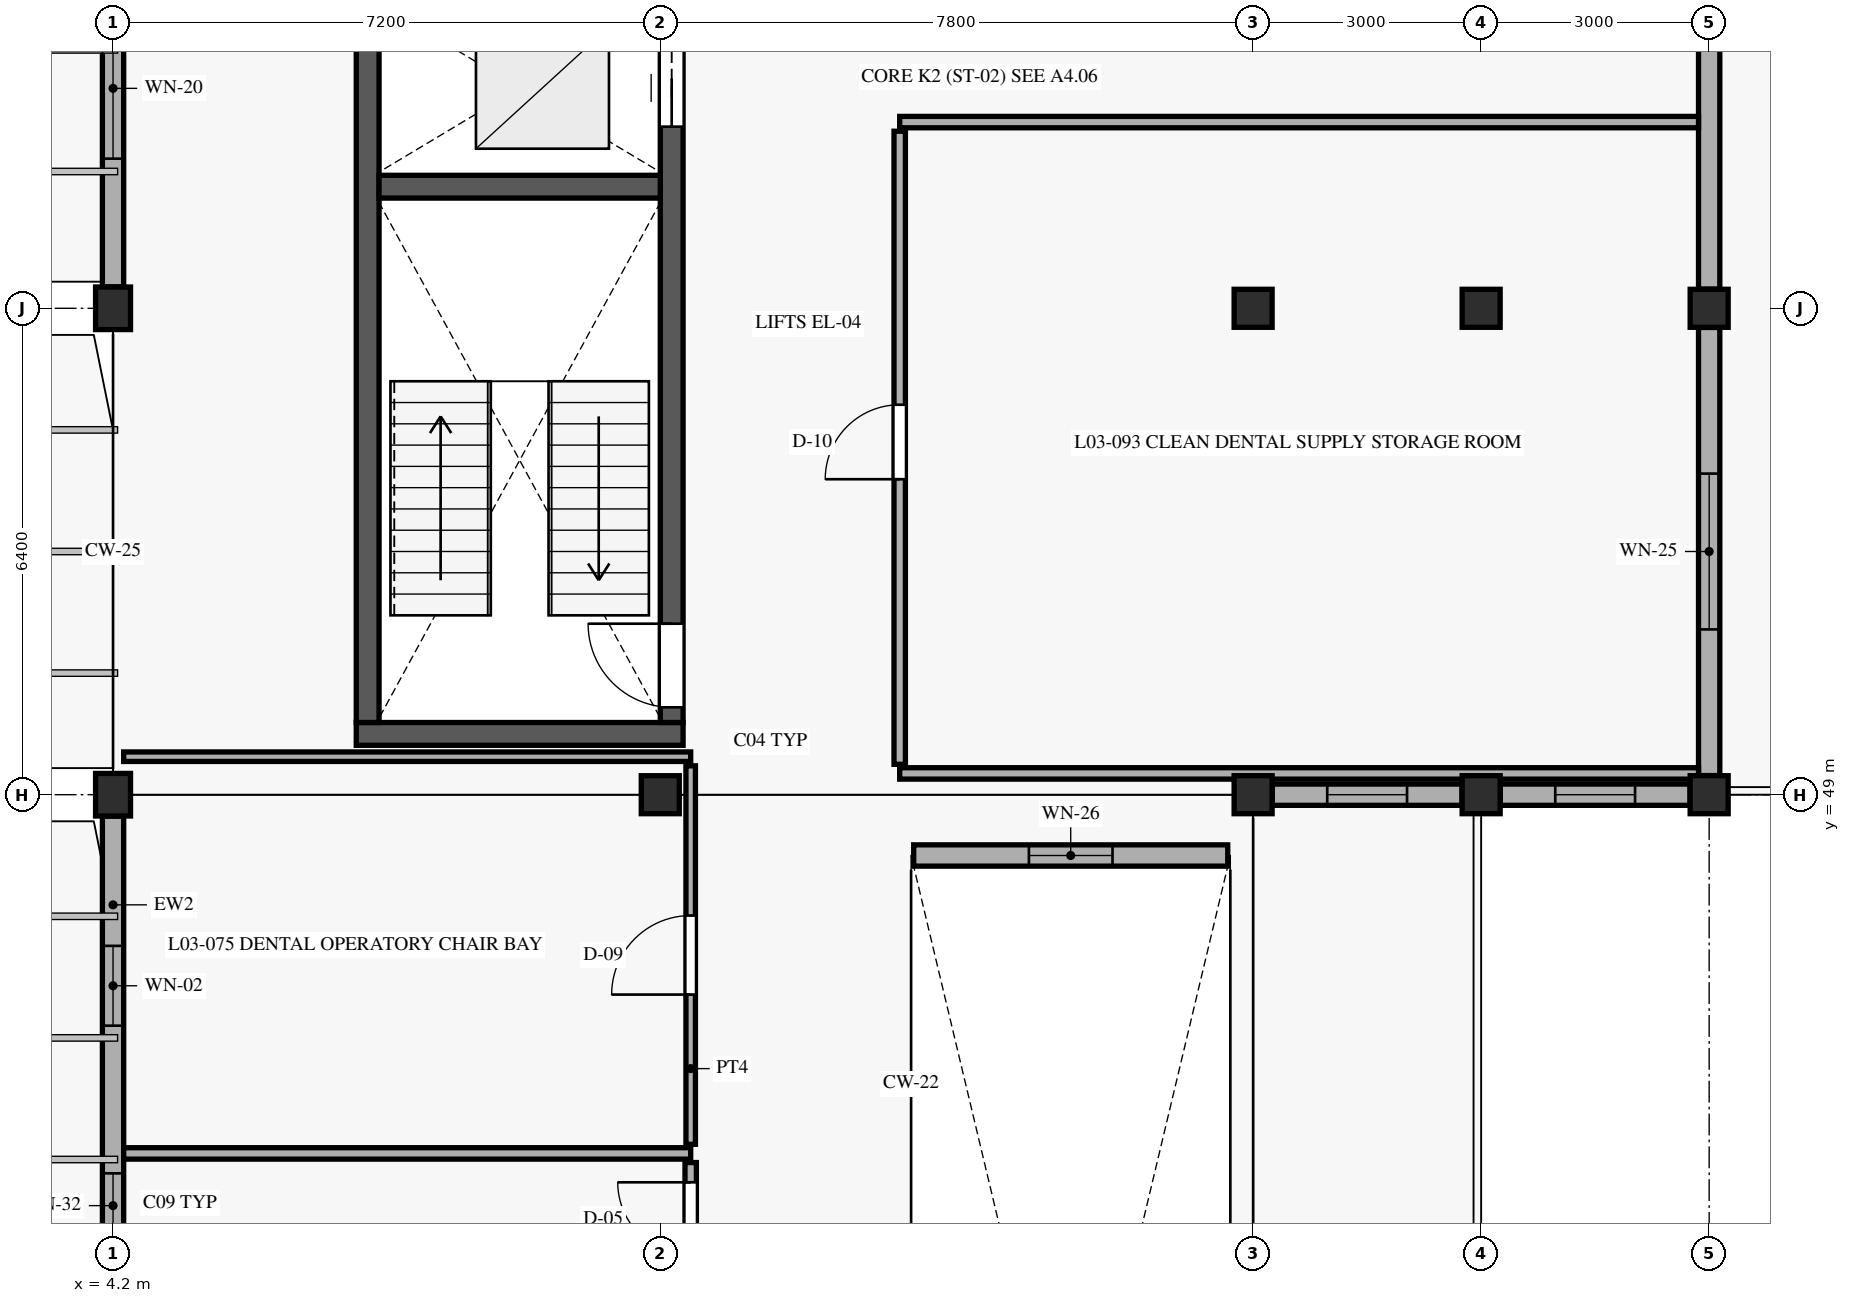
"""IFC4 building model, lengths in metres.
Left out: names, types, materials, properties, quantities, classifications, styles, units other than length and angle.
Written with IfcOpenShell. Run it as: python <this file> out.ifc"""

import sys

from ifc_helpers import new_model, si_unit, direction, frame, frame_2d, origin, origin_with_axes, origin_2d, place, context, subcontext, project, spatial, rectangle, extrude, element, fill, save


model = new_model("IFC4")
c1 = context("Model", 3, precision=1e-05, world=origin(), true_north=direction((0.0, 1.0)))
c2 = subcontext(c1, "Body", "Model", "MODEL_VIEW")
j1 = project(units=[si_unit("LENGTHUNIT", "METRE"), si_unit("PLANEANGLEUNIT", "RADIAN")], contexts=[c1])
p1 = place(None, origin())
s1 = spatial("IfcSite", under=j1, at=p1, CompositionType="ELEMENT")
p2 = place(p1, origin())
s2 = spatial("IfcBuilding", under=s1, at=p2, CompositionType="ELEMENT")
p3 = place(p2, frame((0.0, 0.0, 9.3)))
s3 = spatial("IfcBuildingStorey", under=s2, at=p3, CompositionType="ELEMENT", Elevation=9.3)
for number, where, z_axis, x_axis in (
    (1, (4.2, 49.0, 0.0), (0.0, 0.0, 1.0), (1.0, 0.0, 0.0)),
    (2, (4.2, 55.4, 0.0), (0.0, 0.0, 1.0), (1.0, 0.0, 0.0)),
):
    element("IfcColumn", number, at=place(p3, frame(where, z_axis=z_axis, x_axis=x_axis)), inside=s3, PredefinedType="COLUMN", context=c2, shape_type="SweptSolid", body=[
        extrude(rectangle(XDim=0.46, YDim=0.56, at=origin_2d()), origin(), (0.0, 0.0, 1.0), 4.2),
    ])
for number, where, z_axis, x_axis in (
    (3, (11.4, 49.0, 0.0), (0.0, 0.0, 1.0), (1.0, 0.0, 0.0)),
    (4, (19.2, 49.0, 0.0), (0.0, 0.0, 1.0), (1.0, 0.0, 0.0)),
    (5, (19.2, 55.4, 0.0), (0.0, 0.0, 1.0), (1.0, 0.0, 0.0)),
    (6, (22.2, 49.0, 0.0), (0.0, 0.0, 1.0), (1.0, 0.0, 0.0)),
    (7, (22.2, 55.4, 0.0), (0.0, 0.0, 1.0), (1.0, 0.0, 0.0)),
    (8, (25.2, 49.0, 0.0), (0.0, 0.0, 1.0), (1.0, 0.0, 0.0)),
    (9, (25.2, 55.4, 0.0), (0.0, 0.0, 1.0), (1.0, 0.0, 0.0)),
):
    element("IfcColumn", number, at=place(p3, frame(where, z_axis=z_axis, x_axis=x_axis)), inside=s3, PredefinedType="COLUMN", context=c2, shape_type="SweptSolid", body=[
        extrude(rectangle(XDim=0.5, YDim=0.5, at=origin_2d()), origin(), (0.0, 0.0, 1.0), 4.2),
    ])
p4 = place(p3, frame((7.4, 49.8, 0.0), z_axis=(0.0, 0.0, 1.0), x_axis=(1.0, 0.0, 0.0)))
e10 = element("IfcWall", 10, at=p4, inside=s3, PredefinedType="SHEAR", context=c2, shape_type="SweptSolid", body=[
    extrude(rectangle(XDim=4.3, YDim=0.3, at=frame_2d((2.15, 0.0))), origin(), (0.0, 0.0, 1.0), 3.9),
])
p5 = place(p3, frame((7.55, 59.45, 0.0), z_axis=(0.0, 0.0, 1.0), x_axis=(0.0, -1.0, 0.0)))
e11 = element("IfcWall", 11, at=p5, inside=s3, PredefinedType="SHEAR", context=c2, shape_type="SweptSolid", body=[
    extrude(rectangle(XDim=9.5, YDim=0.3, at=frame_2d((4.75, 0.0))), origin(), (0.0, 0.0, 1.0), 3.9),
])
p6 = place(p3, frame((11.55, 49.95, 0.0), z_axis=(0.0, 0.0, 1.0), x_axis=(0.0, 1.0, 0.0)))
e12 = element("IfcWall", 12, at=p6, inside=s3, PredefinedType="SHEAR", context=c2, shape_type="SweptSolid", body=[
    extrude(rectangle(XDim=9.5, YDim=0.3, at=frame_2d((4.75, 0.0))), origin(), (0.0, 0.0, 1.0), 3.9),
])
p7 = place(p6, frame((0.2, 0.0, 0.0)))
e13 = element("IfcOpeningElement", 13, at=p7, cuts=e12, PredefinedType="OPENING", context=c2, shape_type="SweptSolid", body=[
    extrude(rectangle(XDim=1.1, YDim=2.2, at=frame_2d((0.55, 1.1))), frame((0.0, 0.16, 0.0), z_axis=(0.0, -1.0, 0.0), x_axis=(1.0, 0.0, 0.0)), (0.0, 0.0, 1.0), 0.32),
])
p8 = place(p6, frame((7.84, 0.0, 0.0)))
e14 = element("IfcOpeningElement", 14, at=p8, cuts=e12, PredefinedType="OPENING", context=c2, shape_type="SweptSolid", body=[
    extrude(rectangle(XDim=1.02, YDim=2.15, at=frame_2d((0.51, 1.075))), frame((0.0, 0.16, 0.0), z_axis=(0.0, -1.0, 0.0), x_axis=(1.0, 0.0, 0.0)), (0.0, 0.0, 1.0), 0.32),
])
p9 = place(p3, frame((7.7, 57.0, 0.0), z_axis=(0.0, 0.0, 1.0), x_axis=(1.0, 0.0, 0.0)))
e15 = element("IfcWall", 15, at=p9, inside=s3, PredefinedType="SHEAR", context=c2, shape_type="SweptSolid", body=[
    extrude(rectangle(XDim=3.7, YDim=0.3, at=frame_2d((1.85, 0.0))), origin(), (0.0, 0.0, 1.0), 3.9),
])
p10 = place(p3, frame((4.2, 48.718, 0.0), z_axis=(0.0, 0.0, 1.0), x_axis=(0.0, -1.0, 0.0)))
e16 = element("IfcWall", 16, at=p10, inside=s3, PredefinedType="SOLIDWALL", context=c2, shape_type="SweptSolid", body=[
    extrude(rectangle(XDim=5.836, YDim=0.28, at=frame_2d((2.918, 0.0))), origin(), (0.0, 0.0, 1.0), 3.48),
])
p11 = place(p10, frame((1.707, 0.0, 0.88)))
e17 = element("IfcOpeningElement", 17, at=p11, cuts=e16, PredefinedType="OPENING", context=c2, shape_type="SweptSolid", body=[
    extrude(rectangle(XDim=1.05, YDim=2.2, at=frame_2d((0.525, 1.1))), frame((0.0, 0.15, 0.0), z_axis=(0.0, -1.0, 0.0), x_axis=(1.0, 0.0, 0.0)), (0.0, 0.0, 1.0), 0.3),
])
p12 = place(p10, frame((4.7, 0.0, 0.88)))
e18 = element("IfcOpeningElement", 18, at=p12, cuts=e16, PredefinedType="OPENING", context=c2, shape_type="SweptSolid", body=[
    extrude(rectangle(XDim=0.85, YDim=2.1, at=frame_2d((0.425, 1.05))), frame((0.0, 0.15, 0.0), z_axis=(0.0, -1.0, 0.0), x_axis=(1.0, 0.0, 0.0)), (0.0, 0.0, 1.0), 0.3),
])
p13 = place(p3, frame((4.2, 63.518, 0.0), z_axis=(0.0, 0.0, 1.0), x_axis=(0.0, -1.0, 0.0)))
e19 = element("IfcWall", 19, at=p13, inside=s3, PredefinedType="SOLIDWALL", context=c2, shape_type="SweptSolid", body=[
    extrude(rectangle(XDim=7.836, YDim=0.28, at=frame_2d((3.918, 0.0))), origin(), (0.0, 0.0, 1.0), 3.48),
])
p14 = place(p13, frame((1.862, 0.0, 0.88)))
e20 = element("IfcOpeningElement", 20, at=p14, cuts=e19, PredefinedType="OPENING", context=c2, shape_type="SweptSolid", body=[
    extrude(rectangle(XDim=1.5, YDim=2.2, at=frame_2d((0.75, 1.1))), frame((0.0, 0.15, 0.0), z_axis=(0.0, -1.0, 0.0), x_axis=(1.0, 0.0, 0.0)), (0.0, 0.0, 1.0), 0.3),
])
p15 = place(p13, frame((4.299, 0.0, 0.88)))
e21 = element("IfcOpeningElement", 21, at=p15, cuts=e19, PredefinedType="OPENING", context=c2, shape_type="SweptSolid", body=[
    extrude(rectangle(XDim=1.85, YDim=1.65, at=frame_2d((0.925, 0.825))), frame((0.0, 0.15, 0.0), z_axis=(0.0, -1.0, 0.0), x_axis=(1.0, 0.0, 0.0)), (0.0, 0.0, 1.0), 0.3),
])
p16 = place(p3, frame((25.2, 49.252, 0.0), z_axis=(0.0, 0.0, 1.0), x_axis=(0.0, 1.0, 0.0)))
e22 = element("IfcWall", 22, at=p16, inside=s3, PredefinedType="SOLIDWALL", context=c2, shape_type="SweptSolid", body=[
    extrude(rectangle(XDim=5.896, YDim=0.28, at=frame_2d((2.948, 0.0))), origin(), (0.0, 0.0, 1.0), 3.49),
])
p17 = place(p16, frame((1.923, 0.0, 0.8)))
e23 = element("IfcOpeningElement", 23, at=p17, cuts=e22, PredefinedType="OPENING", context=c2, shape_type="SweptSolid", body=[
    extrude(rectangle(XDim=2.05, YDim=1.95, at=frame_2d((1.025, 0.975))), frame((0.0, 0.15, 0.0), z_axis=(0.0, -1.0, 0.0), x_axis=(1.0, 0.0, 0.0)), (0.0, 0.0, 1.0), 0.3),
])
p18 = place(p3, frame((25.2, 55.652, 0.0), z_axis=(0.0, 0.0, 1.0), x_axis=(0.0, 1.0, 0.0)))
e24 = element("IfcWall", 24, at=p18, inside=s3, PredefinedType="SOLIDWALL", context=c2, shape_type="SweptSolid", body=[
    extrude(rectangle(XDim=7.896, YDim=0.28, at=frame_2d((3.948, 0.0))), origin(), (0.0, 0.0, 1.0), 3.49),
])
p19 = place(p18, frame((3.378, 0.0, 0.0)))
e25 = element("IfcOpeningElement", 25, at=p19, cuts=e24, PredefinedType="OPENING", context=c2, shape_type="SweptSolid", body=[
    extrude(rectangle(XDim=1.14, YDim=2.3, at=frame_2d((0.57, 1.15))), frame((0.0, 0.15, 0.0), z_axis=(0.0, -1.0, 0.0), x_axis=(1.0, 0.0, 0.0)), (0.0, 0.0, 1.0), 0.3),
])
p20 = place(p3, frame((19.452, 49.0, 0.0), z_axis=(0.0, 0.0, 1.0), x_axis=(1.0, 0.0, 0.0)))
e26 = element("IfcWall", 26, at=p20, inside=s3, PredefinedType="SOLIDWALL", context=c2, shape_type="SweptSolid", body=[
    extrude(rectangle(XDim=2.496, YDim=0.28, at=frame_2d((1.248, 0.0))), origin(), (0.0, 0.0, 1.0), 3.59),
])
p21 = place(p20, frame((0.723, 0.0, 0.88)))
e27 = element("IfcOpeningElement", 27, at=p21, cuts=e26, PredefinedType="OPENING", context=c2, shape_type="SweptSolid", body=[
    extrude(rectangle(XDim=1.05, YDim=2.2, at=frame_2d((0.525, 1.1))), frame((0.0, 0.15, 0.0), z_axis=(0.0, -1.0, 0.0), x_axis=(1.0, 0.0, 0.0)), (0.0, 0.0, 1.0), 0.3),
])
p22 = place(p3, frame((22.452, 49.0, 0.0), z_axis=(0.0, 0.0, 1.0), x_axis=(1.0, 0.0, 0.0)))
e28 = element("IfcWall", 28, at=p22, inside=s3, PredefinedType="SOLIDWALL", context=c2, shape_type="SweptSolid", body=[
    extrude(rectangle(XDim=2.496, YDim=0.28, at=frame_2d((1.248, 0.0))), origin(), (0.0, 0.0, 1.0), 3.59),
])
p23 = place(p22, frame((0.723, 0.0, 0.88)))
e29 = element("IfcOpeningElement", 29, at=p23, cuts=e28, PredefinedType="OPENING", context=c2, shape_type="SweptSolid", body=[
    extrude(rectangle(XDim=1.05, YDim=2.2, at=frame_2d((0.525, 1.1))), frame((0.0, 0.15, 0.0), z_axis=(0.0, -1.0, 0.0), x_axis=(1.0, 0.0, 0.0)), (0.0, 0.0, 1.0), 0.3),
])
p24 = place(p3, frame((14.734, 48.2, 0.0), z_axis=(0.0, 0.0, 1.0), x_axis=(1.0, 0.0, 0.0)))
e30 = element("IfcWall", 30, at=p24, inside=s3, PredefinedType="SOLIDWALL", context=c2, shape_type="SweptSolid", body=[
    extrude(rectangle(XDim=4.132, YDim=0.28, at=frame_2d((2.066, 0.0))), origin(), (0.0, 0.0, 1.0), 3.9),
])
p25 = place(p24, frame((1.516, 0.0, 0.85)))
e31 = element("IfcOpeningElement", 31, at=p25, cuts=e30, PredefinedType="OPENING", context=c2, shape_type="SweptSolid", body=[
    extrude(rectangle(XDim=1.1, YDim=1.8, at=frame_2d((0.55, 0.9))), frame((0.0, 0.15, 0.0), z_axis=(0.0, -1.0, 0.0), x_axis=(1.0, 0.0, 0.0)), (0.0, 0.0, 1.0), 0.3),
])
p26 = place(p3, frame((11.8, 42.05, 0.0), z_axis=(0.0, 0.0, 1.0), x_axis=(0.0, 1.0, 0.0)))
e32 = element("IfcWall", 32, at=p26, inside=s3, PredefinedType="PARTITIONING", context=c2, shape_type="SweptSolid", body=[
    extrude(rectangle(XDim=2.11, YDim=0.15, at=frame_2d((1.055, 0.0))), origin(), (0.0, 0.0, 1.0), 3.895),
])
p27 = place(p26, frame((0.89, 0.0, 0.0)))
e33 = element("IfcOpeningElement", 33, at=p27, cuts=e32, PredefinedType="OPENING", context=c2, shape_type="SweptSolid", body=[
    extrude(rectangle(XDim=0.96, YDim=2.1, at=frame_2d((0.48, 1.05))), frame((0.0, 0.085, 0.0), z_axis=(0.0, -1.0, 0.0), x_axis=(1.0, 0.0, 0.0)), (0.0, 0.0, 1.0), 0.17),
])
p28 = place(p3, frame((4.34, 44.28, 0.0), z_axis=(0.0, 0.0, 1.0), x_axis=(1.0, 0.0, 0.0)))
e34 = element("IfcWall", 34, at=p28, inside=s3, PredefinedType="PARTITIONING", context=c2, shape_type="SweptSolid", body=[
    extrude(rectangle(XDim=7.46, YDim=0.15, at=frame_2d((3.73, 0.0))), origin(), (0.0, 0.0, 1.0), 3.475),
])
p29 = place(p3, frame((11.8, 44.4, 0.0), z_axis=(0.0, 0.0, 1.0), x_axis=(0.0, 1.0, 0.0)))
e35 = element("IfcWall", 35, at=p29, inside=s3, PredefinedType="PARTITIONING", context=c2, shape_type="SweptSolid", body=[
    extrude(rectangle(XDim=4.98, YDim=0.125, at=frame_2d((2.49, 0.0))), origin(), (0.0, 0.0, 1.0), 3.245),
])
p30 = place(p29, frame((1.97, 0.0, 0.0)))
e36 = element("IfcOpeningElement", 36, at=p30, cuts=e35, PredefinedType="OPENING", context=c2, shape_type="SweptSolid", body=[
    extrude(rectangle(XDim=1.04, YDim=2.15, at=frame_2d((0.52, 1.075))), frame((0.0, 0.073, 0.0), z_axis=(0.0, -1.0, 0.0), x_axis=(1.0, 0.0, 0.0)), (0.0, 0.0, 1.0), 0.145),
])
p31 = place(p3, frame((4.34, 49.5, 0.0), z_axis=(0.0, 0.0, 1.0), x_axis=(1.0, 0.0, 0.0)))
e37 = element("IfcWall", 37, at=p31, inside=s3, PredefinedType="PARTITIONING", context=c2, shape_type="SweptSolid", body=[
    extrude(rectangle(XDim=7.46, YDim=0.125, at=frame_2d((3.73, 0.0))), origin(), (0.0, 0.0, 1.0), 3.475),
])
p32 = place(p3, frame((14.55, 49.4, 0.0), z_axis=(0.0, 0.0, 1.0), x_axis=(0.0, 1.0, 0.0)))
e38 = element("IfcWall", 38, at=p32, inside=s3, PredefinedType="PARTITIONING", context=c2, shape_type="SweptSolid", body=[
    extrude(rectangle(XDim=8.33, YDim=0.15, at=frame_2d((4.165, 0.0))), origin(), (0.0, 0.0, 1.0), 3.495),
])
p33 = place(p32, frame((3.751, 0.0, 0.0)))
e39 = element("IfcOpeningElement", 39, at=p33, cuts=e38, PredefinedType="OPENING", context=c2, shape_type="SweptSolid", body=[
    extrude(rectangle(XDim=0.98, YDim=2.12, at=frame_2d((0.49, 1.06))), frame((0.0, 0.085, 0.0), z_axis=(0.0, -1.0, 0.0), x_axis=(1.0, 0.0, 0.0)), (0.0, 0.0, 1.0), 0.17),
])
for number, where, z_axis, x_axis in (
    (40, (14.55, 49.28, 0.0), (0.0, 0.0, 1.0), (1.0, 0.0, 0.0)),
    (41, (14.55, 57.85, 0.0), (0.0, 0.0, 1.0), (1.0, 0.0, 0.0)),
):
    element("IfcWall", number, at=place(p3, frame(where, z_axis=z_axis, x_axis=x_axis)), inside=s3, PredefinedType="PARTITIONING", context=c2, shape_type="SweptSolid", body=[
        extrude(rectangle(XDim=10.51, YDim=0.15, at=frame_2d((5.255, 0.0))), origin(), (0.0, 0.0, 1.0), 3.485),
    ])
p34 = place(p7, origin_with_axes())
e42 = element("IfcDoor", 42, at=p34, inside=s3, OperationType="SINGLE_SWING_RIGHT", PredefinedType="DOOR", context=c2, shape_type="SweptSolid", body=[
    extrude(rectangle(XDim=1.1, YDim=2.2, at=frame_2d((0.55, 1.1))), frame((0.0, 0.025, 0.0), z_axis=(0.0, -1.0, 0.0), x_axis=(1.0, 0.0, 0.0)), (0.0, 0.0, 1.0), 0.05),
])
fill(e13, e42)
p35 = place(p8, origin_with_axes())
e43 = element("IfcDoor", 43, at=p35, inside=s3, OperationType="SLIDING_TO_LEFT", PredefinedType="DOOR", context=c2, shape_type="SweptSolid", body=[
    extrude(rectangle(XDim=1.02, YDim=2.15, at=frame_2d((0.51, 1.075))), frame((0.0, 0.025, 0.0), z_axis=(0.0, -1.0, 0.0), x_axis=(1.0, 0.0, 0.0)), (0.0, 0.0, 1.0), 0.05),
])
fill(e14, e43)
p36 = place(p11, origin_with_axes())
e44 = element("IfcWindow", 44, at=p36, inside=s3, PartitioningType="SINGLE_PANEL", PredefinedType="WINDOW", context=c2, shape_type="SweptSolid", body=[
    extrude(rectangle(XDim=1.05, YDim=2.2, at=frame_2d((0.525, 1.1))), frame((0.0, 0.03, 0.0), z_axis=(0.0, -1.0, 0.0), x_axis=(1.0, 0.0, 0.0)), (0.0, 0.0, 1.0), 0.06),
])
fill(e17, e44)
p37 = place(p12, origin_with_axes())
e45 = element("IfcWindow", 45, at=p37, inside=s3, PartitioningType="SINGLE_PANEL", PredefinedType="WINDOW", context=c2, shape_type="SweptSolid", body=[
    extrude(rectangle(XDim=0.85, YDim=2.1, at=frame_2d((0.425, 1.05))), frame((0.0, 0.03, 0.0), z_axis=(0.0, -1.0, 0.0), x_axis=(1.0, 0.0, 0.0)), (0.0, 0.0, 1.0), 0.06),
])
fill(e18, e45)
p38 = place(p15, origin_with_axes())
e46 = element("IfcWindow", 46, at=p38, inside=s3, PartitioningType="SINGLE_PANEL", PredefinedType="WINDOW", context=c2, shape_type="SweptSolid", body=[
    extrude(rectangle(XDim=1.85, YDim=1.65, at=frame_2d((0.925, 0.825))), frame((0.0, 0.03, 0.0), z_axis=(0.0, -1.0, 0.0), x_axis=(1.0, 0.0, 0.0)), (0.0, 0.0, 1.0), 0.06),
])
fill(e21, e46)
p39 = place(p17, origin_with_axes())
e47 = element("IfcWindow", 47, at=p39, inside=s3, PartitioningType="SINGLE_PANEL", PredefinedType="WINDOW", context=c2, shape_type="SweptSolid", body=[
    extrude(rectangle(XDim=2.05, YDim=1.95, at=frame_2d((1.025, 0.975))), frame((0.0, 0.03, 0.0), z_axis=(0.0, -1.0, 0.0), x_axis=(1.0, 0.0, 0.0)), (0.0, 0.0, 1.0), 0.06),
])
fill(e23, e47)
p40 = place(p21, origin_with_axes())
e48 = element("IfcWindow", 48, at=p40, inside=s3, PartitioningType="SINGLE_PANEL", PredefinedType="WINDOW", context=c2, shape_type="SweptSolid", body=[
    extrude(rectangle(XDim=1.05, YDim=2.2, at=frame_2d((0.525, 1.1))), frame((0.0, 0.03, 0.0), z_axis=(0.0, -1.0, 0.0), x_axis=(1.0, 0.0, 0.0)), (0.0, 0.0, 1.0), 0.06),
])
fill(e27, e48)
p41 = place(p23, origin_with_axes())
e49 = element("IfcWindow", 49, at=p41, inside=s3, PartitioningType="SINGLE_PANEL", PredefinedType="WINDOW", context=c2, shape_type="SweptSolid", body=[
    extrude(rectangle(XDim=1.05, YDim=2.2, at=frame_2d((0.525, 1.1))), frame((0.0, 0.03, 0.0), z_axis=(0.0, -1.0, 0.0), x_axis=(1.0, 0.0, 0.0)), (0.0, 0.0, 1.0), 0.06),
])
fill(e29, e49)
p42 = place(p25, origin_with_axes())
e50 = element("IfcWindow", 50, at=p42, inside=s3, PartitioningType="SINGLE_PANEL", PredefinedType="WINDOW", context=c2, shape_type="SweptSolid", body=[
    extrude(rectangle(XDim=1.1, YDim=1.8, at=frame_2d((0.55, 0.9))), frame((0.0, 0.03, 0.0), z_axis=(0.0, -1.0, 0.0), x_axis=(1.0, 0.0, 0.0)), (0.0, 0.0, 1.0), 0.06),
])
fill(e31, e50)
p43 = place(p27, origin_with_axes())
e51 = element("IfcDoor", 51, at=p43, inside=s3, OperationType="SINGLE_SWING_RIGHT", PredefinedType="DOOR", context=c2, shape_type="SweptSolid", body=[
    extrude(rectangle(XDim=0.96, YDim=2.1, at=frame_2d((0.48, 1.05))), frame((0.0, 0.025, 0.0), z_axis=(0.0, -1.0, 0.0), x_axis=(1.0, 0.0, 0.0)), (0.0, 0.0, 1.0), 0.05),
])
fill(e33, e51)
p44 = place(p30, origin_with_axes())
e52 = element("IfcDoor", 52, at=p44, inside=s3, OperationType="SINGLE_SWING_LEFT", PredefinedType="DOOR", context=c2, shape_type="SweptSolid", body=[
    extrude(rectangle(XDim=1.04, YDim=2.15, at=frame_2d((0.52, 1.075))), frame((0.0, 0.025, 0.0), z_axis=(0.0, -1.0, 0.0), x_axis=(1.0, 0.0, 0.0)), (0.0, 0.0, 1.0), 0.05),
])
fill(e36, e52)
p45 = place(p33, frame((0.98, 0.0, 0.0), z_axis=(0.0, 0.0, 1.0), x_axis=(-1.0, 0.0, 0.0)))
e53 = element("IfcDoor", 53, at=p45, inside=s3, OperationType="SINGLE_SWING_RIGHT", PredefinedType="DOOR", context=c2, shape_type="SweptSolid", body=[
    extrude(rectangle(XDim=0.98, YDim=2.12, at=frame_2d((0.49, 1.06))), frame((0.0, 0.025, 0.0), z_axis=(0.0, -1.0, 0.0), x_axis=(1.0, 0.0, 0.0)), (0.0, 0.0, 1.0), 0.05),
])
fill(e39, e53)
save(model, sys.argv[1])
